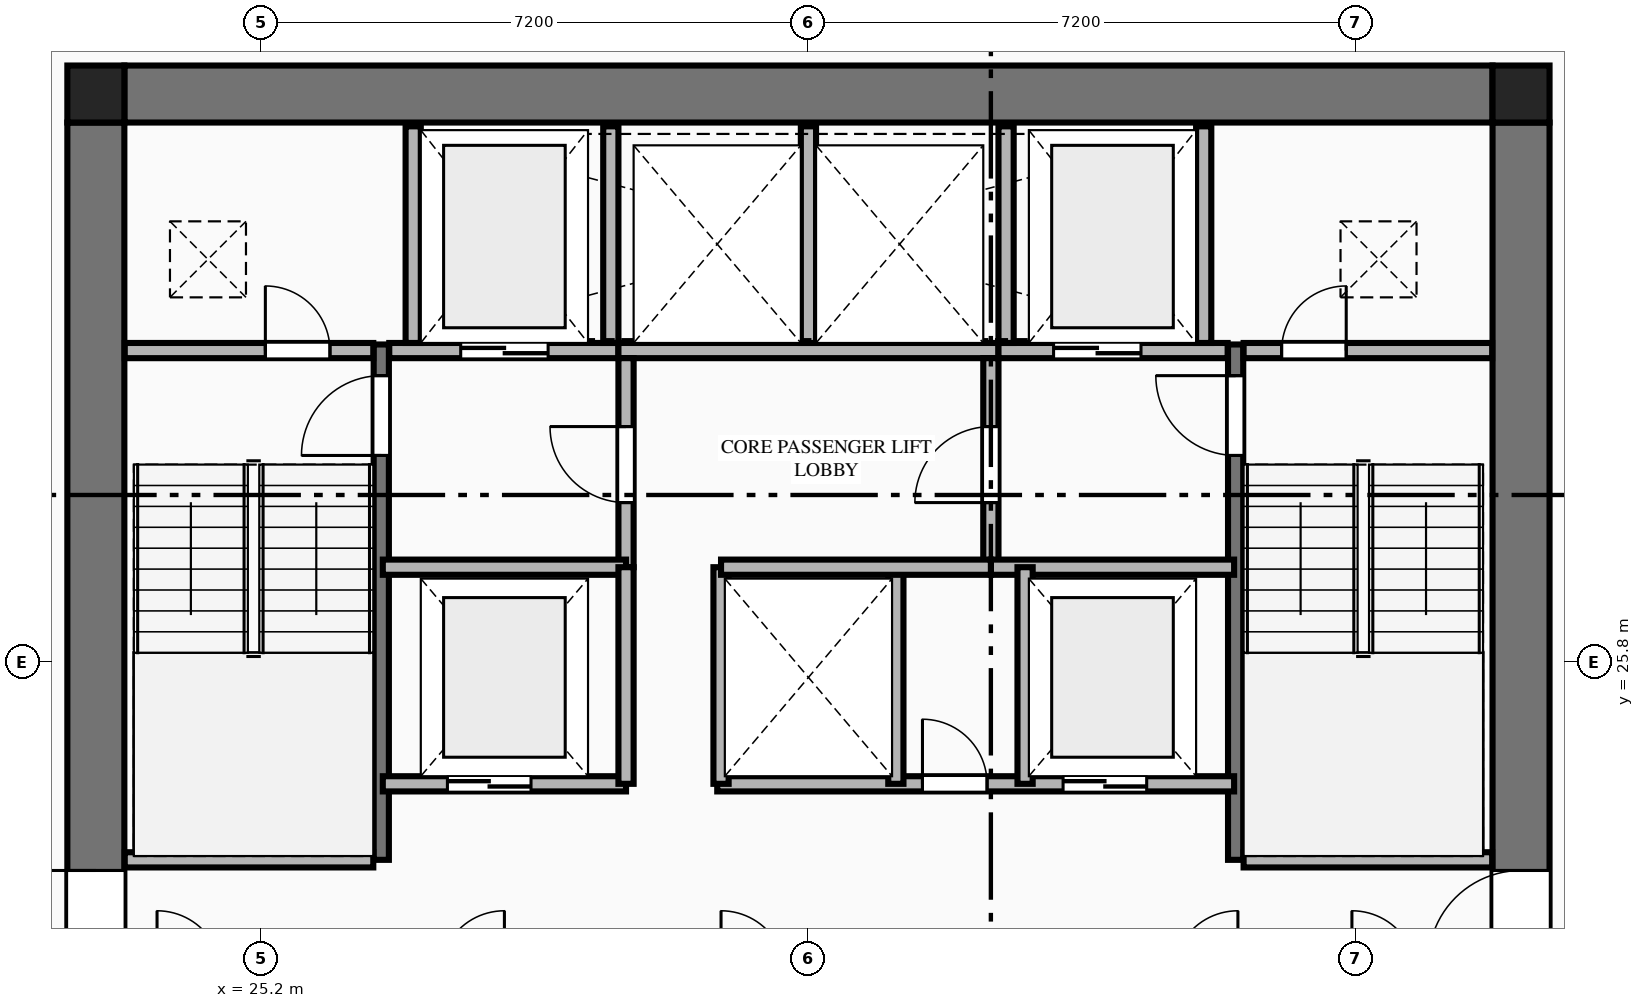
"""IFC4 building model, lengths in metres.
Left out: names, types, materials, properties, quantities, classifications, styles, units other than length and angle.
Written with IfcOpenShell. Run it as: python <this file> out.ifc"""

import sys

from ifc_helpers import new_model, si_unit, direction, frame, frame_2d, origin, origin_2d, place, context, subcontext, project, spatial, rectangle, extrude, element, fill, save


model = new_model("IFC4")
c1 = context("Model", 3, precision=1e-05, world=origin(), true_north=direction((0.0, 1.0)))
c2 = subcontext(c1, "Body", "Model", "MODEL_VIEW")
j1 = project(units=[si_unit("LENGTHUNIT", "METRE"), si_unit("PLANEANGLEUNIT", "RADIAN")], contexts=[c1])
p1 = place(None, origin())
s1 = spatial("IfcSite", under=j1, at=p1, CompositionType="ELEMENT")
p2 = place(p1, origin())
s2 = spatial("IfcBuilding", under=s1, at=p2, CompositionType="ELEMENT")
p3 = place(p2, frame((0.0, 0.0, 130.35)))
s3 = spatial("IfcBuildingStorey", under=s2, at=p3, CompositionType="ELEMENT", Elevation=130.35)
for number, where, z_axis, x_axis in (
    (1, (41.775, 33.275, 0.0), (0.0, 0.0, 1.0), (1.0, 0.0, 0.0)),
    (2, (23.025, 33.275, 0.0), (0.0, 0.0, 1.0), (1.0, 0.0, 0.0)),
):
    element("IfcColumn", number, at=place(p3, frame(where, z_axis=z_axis, x_axis=x_axis)), inside=s3, PredefinedType="COLUMN", context=c2, shape_type="SweptSolid", body=[
        extrude(rectangle(XDim=0.75, YDim=0.75, at=origin_2d()), origin(), (0.0, 0.0, 1.0), 3.55),
    ])
p4 = place(p3, frame((23.4, 33.275, 0.0), z_axis=(0.0, 0.0, 1.0), x_axis=(1.0, 0.0, 0.0)))
e3 = element("IfcWall", 3, at=p4, inside=s3, PredefinedType="SHEAR", context=c2, shape_type="SweptSolid", body=[
    extrude(rectangle(XDim=18.0, YDim=0.75, at=frame_2d((9.0, 0.0))), origin(), (0.0, 0.0, 1.0), 3.34),
])
p5 = place(p3, frame((23.025, 18.9, 0.0), z_axis=(0.0, 0.0, 1.0), x_axis=(0.0, 1.0, 0.0)))
e4 = element("IfcWall", 4, at=p5, inside=s3, PredefinedType="SHEAR", context=c2, shape_type="SweptSolid", body=[
    extrude(rectangle(XDim=14.0, YDim=0.75, at=frame_2d((7.0, 0.0))), origin(), (0.0, 0.0, 1.0), 3.34),
])
p6 = place(p5, frame((2.94, 0.0, 0.0)))
e5 = element("IfcOpeningElement", 5, at=p6, cuts=e4, PredefinedType="OPENING", context=c2, shape_type="SweptSolid", body=[
    extrude(rectangle(XDim=1.22, YDim=2.25, at=frame_2d((0.61, 1.125))), frame((0.0, 0.385, 0.0), z_axis=(0.0, -1.0, 0.0), x_axis=(1.0, 0.0, 0.0)), (0.0, 0.0, 1.0), 0.77),
])
p7 = place(p3, frame((41.775, 18.9, 0.0), z_axis=(0.0, 0.0, 1.0), x_axis=(0.0, 1.0, 0.0)))
e6 = element("IfcWall", 6, at=p7, inside=s3, PredefinedType="SHEAR", context=c2, shape_type="SweptSolid", body=[
    extrude(rectangle(XDim=14.0, YDim=0.75, at=frame_2d((7.0, 0.0))), origin(), (0.0, 0.0, 1.0), 3.34),
])
p8 = place(p7, frame((2.94, 0.0, 0.0)))
e7 = element("IfcOpeningElement", 7, at=p8, cuts=e6, PredefinedType="OPENING", context=c2, shape_type="SweptSolid", body=[
    extrude(rectangle(XDim=1.22, YDim=2.25, at=frame_2d((0.61, 1.125))), frame((0.0, 0.385, 0.0), z_axis=(0.0, -1.0, 0.0), x_axis=(1.0, 0.0, 0.0)), (0.0, 0.0, 1.0), 0.77),
])
p9 = place(p3, frame((26.78, 23.2, 0.0), z_axis=(0.0, 0.0, 1.0), x_axis=(0.0, 1.0, 0.0)))
e8 = element("IfcWall", 8, at=p9, inside=s3, PredefinedType="SHEAR", context=c2, shape_type="SweptSolid", body=[
    extrude(rectangle(XDim=6.78, YDim=0.2, at=frame_2d((3.39, 0.0))), origin(), (0.0, 0.0, 1.0), 3.55),
])
p10 = place(p9, frame((5.32, 0.0, 0.0)))
e9 = element("IfcOpeningElement", 9, at=p10, cuts=e8, PredefinedType="OPENING", context=c2, shape_type="SweptSolid", body=[
    extrude(rectangle(XDim=1.05, YDim=2.15, at=frame_2d((0.525, 1.075))), frame((0.0, 0.11, 0.0), z_axis=(0.0, -1.0, 0.0), x_axis=(1.0, 0.0, 0.0)), (0.0, 0.0, 1.0), 0.22),
])
p11 = place(p3, frame((23.405, 23.2, 0.0), z_axis=(0.0, 0.0, 1.0), x_axis=(1.0, 0.0, 0.0)))
e10 = element("IfcWall", 10, at=p11, inside=s3, PredefinedType="PLUMBINGWALL", context=c2, shape_type="SweptSolid", body=[
    extrude(rectangle(XDim=3.27, YDim=0.2, at=frame_2d((1.635, 0.0))), origin(), (0.0, 0.0, 1.0), 3.34),
])
p12 = place(p3, frame((38.02, 23.2, 0.0), z_axis=(0.0, 0.0, 1.0), x_axis=(0.0, 1.0, 0.0)))
e11 = element("IfcWall", 11, at=p12, inside=s3, PredefinedType="SHEAR", context=c2, shape_type="SweptSolid", body=[
    extrude(rectangle(XDim=6.78, YDim=0.2, at=frame_2d((3.39, 0.0))), origin(), (0.0, 0.0, 1.0), 3.55),
])
p13 = place(p12, frame((5.32, 0.0, 0.0)))
e12 = element("IfcOpeningElement", 12, at=p13, cuts=e11, PredefinedType="OPENING", context=c2, shape_type="SweptSolid", body=[
    extrude(rectangle(XDim=1.05, YDim=2.15, at=frame_2d((0.525, 1.075))), frame((0.0, 0.11, 0.0), z_axis=(0.0, -1.0, 0.0), x_axis=(1.0, 0.0, 0.0)), (0.0, 0.0, 1.0), 0.22),
])
p14 = place(p3, frame((38.125, 23.2, 0.0), z_axis=(0.0, 0.0, 1.0), x_axis=(1.0, 0.0, 0.0)))
e13 = element("IfcWall", 13, at=p14, inside=s3, PredefinedType="PLUMBINGWALL", context=c2, shape_type="SweptSolid", body=[
    extrude(rectangle(XDim=3.27, YDim=0.2, at=frame_2d((1.635, 0.0))), origin(), (0.0, 0.0, 1.0), 3.34),
])
p15 = place(p3, frame((23.405, 29.9, 0.0), z_axis=(0.0, 0.0, 1.0), x_axis=(1.0, 0.0, 0.0)))
e14 = element("IfcWall", 14, at=p15, inside=s3, PredefinedType="PLUMBINGWALL", context=c2, shape_type="SweptSolid", body=[
    extrude(rectangle(XDim=3.27, YDim=0.2, at=frame_2d((1.635, 0.0))), origin(), (0.0, 0.0, 1.0), 3.34),
])
p16 = place(p15, frame((1.85, 0.0, 0.0)))
e15 = element("IfcOpeningElement", 15, at=p16, cuts=e14, PredefinedType="OPENING", context=c2, shape_type="SweptSolid", body=[
    extrude(rectangle(XDim=0.85, YDim=2.05, at=frame_2d((0.425, 1.025))), frame((0.0, 0.11, 0.0), z_axis=(0.0, -1.0, 0.0), x_axis=(1.0, 0.0, 0.0)), (0.0, 0.0, 1.0), 0.22),
])
p17 = place(p3, frame((26.885, 29.9, 0.0), z_axis=(0.0, 0.0, 1.0), x_axis=(1.0, 0.0, 0.0)))
e16 = element("IfcWall", 16, at=p17, inside=s3, PredefinedType="PLUMBINGWALL", context=c2, shape_type="SweptSolid", body=[
    extrude(rectangle(XDim=3.015, YDim=0.2, at=frame_2d((1.507, 0.0))), origin(), (0.0, 0.0, 1.0), 3.34),
])
p18 = place(p17, frame((0.94, 0.0, 0.0)))
e17 = element("IfcOpeningElement", 17, at=p18, cuts=e16, PredefinedType="OPENING", context=c2, shape_type="SweptSolid", body=[
    extrude(rectangle(XDim=1.15, YDim=2.2, at=frame_2d((0.575, 1.1))), frame((0.0, 0.11, 0.0), z_axis=(0.0, -1.0, 0.0), x_axis=(1.0, 0.0, 0.0)), (0.0, 0.0, 1.0), 0.22),
])
p19 = place(p3, frame((29.9, 29.9, 0.0), z_axis=(0.0, 0.0, 1.0), x_axis=(1.0, 0.0, 0.0)))
e18 = element("IfcWall", 18, at=p19, inside=s3, PredefinedType="PLUMBINGWALL", context=c2, shape_type="SweptSolid", body=[
    extrude(rectangle(XDim=5.0, YDim=0.2, at=frame_2d((2.5, 0.0))), origin(), (0.0, 0.0, 1.0), 3.34),
])
p20 = place(p3, frame((34.9, 29.9, 0.0), z_axis=(0.0, 0.0, 1.0), x_axis=(1.0, 0.0, 0.0)))
e19 = element("IfcWall", 19, at=p20, inside=s3, PredefinedType="PLUMBINGWALL", context=c2, shape_type="SweptSolid", body=[
    extrude(rectangle(XDim=3.015, YDim=0.2, at=frame_2d((1.508, 0.0))), origin(), (0.0, 0.0, 1.0), 3.34),
])
p21 = place(p20, frame((0.725, 0.0, 0.0)))
e20 = element("IfcOpeningElement", 20, at=p21, cuts=e19, PredefinedType="OPENING", context=c2, shape_type="SweptSolid", body=[
    extrude(rectangle(XDim=1.15, YDim=2.2, at=frame_2d((0.575, 1.1))), frame((0.0, 0.11, 0.0), z_axis=(0.0, -1.0, 0.0), x_axis=(1.0, 0.0, 0.0)), (0.0, 0.0, 1.0), 0.22),
])
p22 = place(p3, frame((38.125, 29.9, 0.0), z_axis=(0.0, 0.0, 1.0), x_axis=(1.0, 0.0, 0.0)))
e21 = element("IfcWall", 21, at=p22, inside=s3, PredefinedType="PLUMBINGWALL", context=c2, shape_type="SweptSolid", body=[
    extrude(rectangle(XDim=3.27, YDim=0.2, at=frame_2d((1.635, 0.0))), origin(), (0.0, 0.0, 1.0), 3.34),
])
p23 = place(p22, frame((0.5, 0.0, 0.0)))
e22 = element("IfcOpeningElement", 22, at=p23, cuts=e21, PredefinedType="OPENING", context=c2, shape_type="SweptSolid", body=[
    extrude(rectangle(XDim=0.85, YDim=2.05, at=frame_2d((0.425, 1.025))), frame((0.0, 0.11, 0.0), z_axis=(0.0, -1.0, 0.0), x_axis=(1.0, 0.0, 0.0)), (0.0, 0.0, 1.0), 0.22),
])
for number, where, z_axis, x_axis in (
    (23, (27.2, 30.0, 0.0), (0.0, 0.0, 1.0), (0.0, 1.0, 0.0)),
    (24, (29.8, 30.0, 0.0), (0.0, 0.0, 1.0), (0.0, 1.0, 0.0)),
    (25, (32.4, 30.0, 0.0), (0.0, 0.0, 1.0), (0.0, 1.0, 0.0)),
    (26, (35.0, 30.0, 0.0), (0.0, 0.0, 1.0), (0.0, 1.0, 0.0)),
    (27, (37.6, 30.0, 0.0), (0.0, 0.0, 1.0), (0.0, 1.0, 0.0)),
):
    element("IfcWall", number, at=place(p3, frame(where, z_axis=z_axis, x_axis=x_axis)), inside=s3, PredefinedType="PLUMBINGWALL", context=c2, shape_type="SweptSolid", body=[
        extrude(rectangle(XDim=2.85, YDim=0.2, at=frame_2d((1.425, 0.0))), origin(), (0.0, 0.0, 1.0), 3.34),
    ])
p24 = place(p3, frame((30.0, 27.05, 0.0), z_axis=(0.0, 0.0, 1.0), x_axis=(0.0, 1.0, 0.0)))
e28 = element("IfcWall", 28, at=p24, inside=s3, PredefinedType="PLUMBINGWALL", context=c2, shape_type="SweptSolid", body=[
    extrude(rectangle(XDim=2.75, YDim=0.2, at=frame_2d((1.375, 0.0))), origin(), (0.0, 0.0, 1.0), 3.34),
])
p25 = place(p24, frame((0.85, 0.0, 0.0)))
e29 = element("IfcOpeningElement", 29, at=p25, cuts=e28, PredefinedType="OPENING", context=c2, shape_type="SweptSolid", body=[
    extrude(rectangle(XDim=1.0, YDim=2.15, at=frame_2d((0.5, 1.075))), frame((0.0, 0.11, 0.0), z_axis=(0.0, -1.0, 0.0), x_axis=(1.0, 0.0, 0.0)), (0.0, 0.0, 1.0), 0.22),
])
p26 = place(p3, frame((26.8, 27.05, 0.0), z_axis=(0.0, 0.0, 1.0), x_axis=(1.0, 0.0, 0.0)))
e30 = element("IfcWall", 30, at=p26, inside=s3, PredefinedType="PLUMBINGWALL", context=c2, shape_type="SweptSolid", body=[
    extrude(rectangle(XDim=3.2, YDim=0.2, at=frame_2d((1.6, 0.0))), origin(), (0.0, 0.0, 1.0), 3.34),
])
p27 = place(p3, frame((34.8, 27.05, 0.0), z_axis=(0.0, 0.0, 1.0), x_axis=(0.0, 1.0, 0.0)))
e31 = element("IfcWall", 31, at=p27, inside=s3, PredefinedType="PLUMBINGWALL", context=c2, shape_type="SweptSolid", body=[
    extrude(rectangle(XDim=2.75, YDim=0.2, at=frame_2d((1.375, 0.0))), origin(), (0.0, 0.0, 1.0), 3.34),
])
p28 = place(p27, frame((0.85, 0.0, 0.0)))
e32 = element("IfcOpeningElement", 32, at=p28, cuts=e31, PredefinedType="OPENING", context=c2, shape_type="SweptSolid", body=[
    extrude(rectangle(XDim=1.0, YDim=2.15, at=frame_2d((0.5, 1.075))), frame((0.0, 0.11, 0.0), z_axis=(0.0, -1.0, 0.0), x_axis=(1.0, 0.0, 0.0)), (0.0, 0.0, 1.0), 0.22),
])
p29 = place(p3, frame((34.8, 27.05, 0.0), z_axis=(0.0, 0.0, 1.0), x_axis=(1.0, 0.0, 0.0)))
e33 = element("IfcWall", 33, at=p29, inside=s3, PredefinedType="PLUMBINGWALL", context=c2, shape_type="SweptSolid", body=[
    extrude(rectangle(XDim=3.2, YDim=0.2, at=frame_2d((1.6, 0.0))), origin(), (0.0, 0.0, 1.0), 3.34),
])
p30 = place(p3, frame((26.8, 24.2, 0.0), z_axis=(0.0, 0.0, 1.0), x_axis=(1.0, 0.0, 0.0)))
e34 = element("IfcWall", 34, at=p30, inside=s3, PredefinedType="PLUMBINGWALL", context=c2, shape_type="SweptSolid", body=[
    extrude(rectangle(XDim=3.2, YDim=0.2, at=frame_2d((1.6, 0.0))), origin(), (0.0, 0.0, 1.0), 3.34),
])
p31 = place(p30, frame((0.85, 0.0, 0.0)))
e35 = element("IfcOpeningElement", 35, at=p31, cuts=e34, PredefinedType="OPENING", context=c2, shape_type="SweptSolid", body=[
    extrude(rectangle(XDim=1.1, YDim=2.2, at=frame_2d((0.55, 1.1))), frame((0.0, 0.11, 0.0), z_axis=(0.0, -1.0, 0.0), x_axis=(1.0, 0.0, 0.0)), (0.0, 0.0, 1.0), 0.22),
])
p32 = place(p3, frame((30.0, 24.2, 0.0), z_axis=(0.0, 0.0, 1.0), x_axis=(0.0, 1.0, 0.0)))
e36 = element("IfcWall", 36, at=p32, inside=s3, PredefinedType="PLUMBINGWALL", context=c2, shape_type="SweptSolid", body=[
    extrude(rectangle(XDim=2.85, YDim=0.2, at=frame_2d((1.425, 0.0))), origin(), (0.0, 0.0, 1.0), 3.34),
])
p33 = place(p3, frame((31.2, 24.2, 0.0), z_axis=(0.0, 0.0, 1.0), x_axis=(1.0, 0.0, 0.0)))
e37 = element("IfcWall", 37, at=p33, inside=s3, PredefinedType="PLUMBINGWALL", context=c2, shape_type="SweptSolid", body=[
    extrude(rectangle(XDim=6.8, YDim=0.2, at=frame_2d((3.4, 0.0))), origin(), (0.0, 0.0, 1.0), 3.34),
])
p34 = place(p33, frame((2.7, 0.0, 0.0)))
e38 = element("IfcOpeningElement", 38, at=p34, cuts=e37, PredefinedType="OPENING", context=c2, shape_type="SweptSolid", body=[
    extrude(rectangle(XDim=0.85, YDim=2.05, at=frame_2d((0.425, 1.025))), frame((0.0, 0.11, 0.0), z_axis=(0.0, -1.0, 0.0), x_axis=(1.0, 0.0, 0.0)), (0.0, 0.0, 1.0), 0.22),
])
p35 = place(p33, frame((4.55, 0.0, 0.0)))
e39 = element("IfcOpeningElement", 39, at=p35, cuts=e37, PredefinedType="OPENING", context=c2, shape_type="SweptSolid", body=[
    extrude(rectangle(XDim=1.1, YDim=2.2, at=frame_2d((0.55, 1.1))), frame((0.0, 0.11, 0.0), z_axis=(0.0, -1.0, 0.0), x_axis=(1.0, 0.0, 0.0)), (0.0, 0.0, 1.0), 0.22),
])
for number, where, z_axis, x_axis in (
    (40, (31.25, 24.2, 0.0), (0.0, 0.0, 1.0), (0.0, 1.0, 0.0)),
    (41, (33.55, 24.2, 0.0), (0.0, 0.0, 1.0), (0.0, 1.0, 0.0)),
    (42, (35.25, 24.2, 0.0), (0.0, 0.0, 1.0), (0.0, 1.0, 0.0)),
):
    element("IfcWall", number, at=place(p3, frame(where, z_axis=z_axis, x_axis=x_axis)), inside=s3, PredefinedType="PLUMBINGWALL", context=c2, shape_type="SweptSolid", body=[
        extrude(rectangle(XDim=2.85, YDim=0.2, at=frame_2d((1.425, 0.0))), origin(), (0.0, 0.0, 1.0), 3.34),
    ])
p36 = place(p3, frame((31.25, 27.05, 0.0), z_axis=(0.0, 0.0, 1.0), x_axis=(1.0, 0.0, 0.0)))
e43 = element("IfcWall", 43, at=p36, inside=s3, PredefinedType="PLUMBINGWALL", context=c2, shape_type="SweptSolid", body=[
    extrude(rectangle(XDim=3.55, YDim=0.2, at=frame_2d((1.775, 0.0))), origin(), (0.0, 0.0, 1.0), 3.34),
])
p37 = place(p6, origin())
e44 = element("IfcDoor", 44, at=p37, inside=s3, OperationType="SINGLE_SWING_RIGHT", PredefinedType="DOOR", context=c2, shape_type="SweptSolid", body=[
    extrude(rectangle(XDim=1.22, YDim=2.25, at=frame_2d((0.61, 1.125))), frame((0.0, 0.025, 0.0), z_axis=(0.0, -1.0, 0.0), x_axis=(1.0, 0.0, 0.0)), (0.0, 0.0, 1.0), 0.05),
])
fill(e5, e44)
p38 = place(p8, origin())
e45 = element("IfcDoor", 45, at=p38, inside=s3, OperationType="SINGLE_SWING_LEFT", PredefinedType="DOOR", context=c2, shape_type="SweptSolid", body=[
    extrude(rectangle(XDim=1.22, YDim=2.25, at=frame_2d((0.61, 1.125))), frame((0.0, 0.025, 0.0), z_axis=(0.0, -1.0, 0.0), x_axis=(1.0, 0.0, 0.0)), (0.0, 0.0, 1.0), 0.05),
])
fill(e7, e45)
p39 = place(p10, origin())
e46 = element("IfcDoor", 46, at=p39, inside=s3, OperationType="SINGLE_SWING_LEFT", PredefinedType="DOOR", context=c2, shape_type="SweptSolid", body=[
    extrude(rectangle(XDim=1.05, YDim=2.15, at=frame_2d((0.525, 1.075))), frame((0.0, 0.025, 0.0), z_axis=(0.0, -1.0, 0.0), x_axis=(1.0, 0.0, 0.0)), (0.0, 0.0, 1.0), 0.05),
])
fill(e9, e46)
p40 = place(p13, origin())
e47 = element("IfcDoor", 47, at=p40, inside=s3, OperationType="SINGLE_SWING_RIGHT", PredefinedType="DOOR", context=c2, shape_type="SweptSolid", body=[
    extrude(rectangle(XDim=1.05, YDim=2.15, at=frame_2d((0.525, 1.075))), frame((0.0, 0.025, 0.0), z_axis=(0.0, -1.0, 0.0), x_axis=(1.0, 0.0, 0.0)), (0.0, 0.0, 1.0), 0.05),
])
fill(e12, e47)
p41 = place(p16, origin())
e48 = element("IfcDoor", 48, at=p41, inside=s3, OperationType="SINGLE_SWING_LEFT", PredefinedType="DOOR", context=c2, shape_type="SweptSolid", body=[
    extrude(rectangle(XDim=0.85, YDim=2.05, at=frame_2d((0.425, 1.025))), frame((0.0, 0.025, 0.0), z_axis=(0.0, -1.0, 0.0), x_axis=(1.0, 0.0, 0.0)), (0.0, 0.0, 1.0), 0.05),
])
fill(e15, e48)
p42 = place(p23, origin())
e49 = element("IfcDoor", 49, at=p42, inside=s3, OperationType="SINGLE_SWING_RIGHT", PredefinedType="DOOR", context=c2, shape_type="SweptSolid", body=[
    extrude(rectangle(XDim=0.85, YDim=2.05, at=frame_2d((0.425, 1.025))), frame((0.0, 0.025, 0.0), z_axis=(0.0, -1.0, 0.0), x_axis=(1.0, 0.0, 0.0)), (0.0, 0.0, 1.0), 0.05),
])
fill(e22, e49)
p43 = place(p18, origin())
e50 = element("IfcDoor", 50, at=p43, inside=s3, OperationType="DOUBLE_DOOR_SLIDING", PredefinedType="DOOR", context=c2, shape_type="SweptSolid", body=[
    extrude(rectangle(XDim=1.15, YDim=2.2, at=frame_2d((0.575, 1.1))), frame((0.0, 0.025, 0.0), z_axis=(0.0, -1.0, 0.0), x_axis=(1.0, 0.0, 0.0)), (0.0, 0.0, 1.0), 0.05),
])
fill(e17, e50)
p44 = place(p21, origin())
e51 = element("IfcDoor", 51, at=p44, inside=s3, OperationType="DOUBLE_DOOR_SLIDING", PredefinedType="DOOR", context=c2, shape_type="SweptSolid", body=[
    extrude(rectangle(XDim=1.15, YDim=2.2, at=frame_2d((0.575, 1.1))), frame((0.0, 0.025, 0.0), z_axis=(0.0, -1.0, 0.0), x_axis=(1.0, 0.0, 0.0)), (0.0, 0.0, 1.0), 0.05),
])
fill(e20, e51)
p45 = place(p25, origin())
e52 = element("IfcDoor", 52, at=p45, inside=s3, OperationType="SINGLE_SWING_RIGHT", PredefinedType="DOOR", context=c2, shape_type="SweptSolid", body=[
    extrude(rectangle(XDim=1.0, YDim=2.15, at=frame_2d((0.5, 1.075))), frame((0.0, 0.025, 0.0), z_axis=(0.0, -1.0, 0.0), x_axis=(1.0, 0.0, 0.0)), (0.0, 0.0, 1.0), 0.05),
])
fill(e29, e52)
p46 = place(p28, origin())
e53 = element("IfcDoor", 53, at=p46, inside=s3, OperationType="SINGLE_SWING_LEFT", PredefinedType="DOOR", context=c2, shape_type="SweptSolid", body=[
    extrude(rectangle(XDim=1.0, YDim=2.15, at=frame_2d((0.5, 1.075))), frame((0.0, 0.025, 0.0), z_axis=(0.0, -1.0, 0.0), x_axis=(1.0, 0.0, 0.0)), (0.0, 0.0, 1.0), 0.05),
])
fill(e32, e53)
p47 = place(p31, origin())
e54 = element("IfcDoor", 54, at=p47, inside=s3, OperationType="DOUBLE_DOOR_SLIDING", PredefinedType="DOOR", context=c2, shape_type="SweptSolid", body=[
    extrude(rectangle(XDim=1.1, YDim=2.2, at=frame_2d((0.55, 1.1))), frame((0.0, 0.025, 0.0), z_axis=(0.0, -1.0, 0.0), x_axis=(1.0, 0.0, 0.0)), (0.0, 0.0, 1.0), 0.05),
])
fill(e35, e54)
p48 = place(p34, origin())
e55 = element("IfcDoor", 55, at=p48, inside=s3, OperationType="SINGLE_SWING_LEFT", PredefinedType="DOOR", context=c2, shape_type="SweptSolid", body=[
    extrude(rectangle(XDim=0.85, YDim=2.05, at=frame_2d((0.425, 1.025))), frame((0.0, 0.025, 0.0), z_axis=(0.0, -1.0, 0.0), x_axis=(1.0, 0.0, 0.0)), (0.0, 0.0, 1.0), 0.05),
])
fill(e38, e55)
p49 = place(p35, origin())
e56 = element("IfcDoor", 56, at=p49, inside=s3, OperationType="DOUBLE_DOOR_SLIDING", PredefinedType="DOOR", context=c2, shape_type="SweptSolid", body=[
    extrude(rectangle(XDim=1.1, YDim=2.2, at=frame_2d((0.55, 1.1))), frame((0.0, 0.025, 0.0), z_axis=(0.0, -1.0, 0.0), x_axis=(1.0, 0.0, 0.0)), (0.0, 0.0, 1.0), 0.05),
])
fill(e39, e56)
save(model, sys.argv[1])
